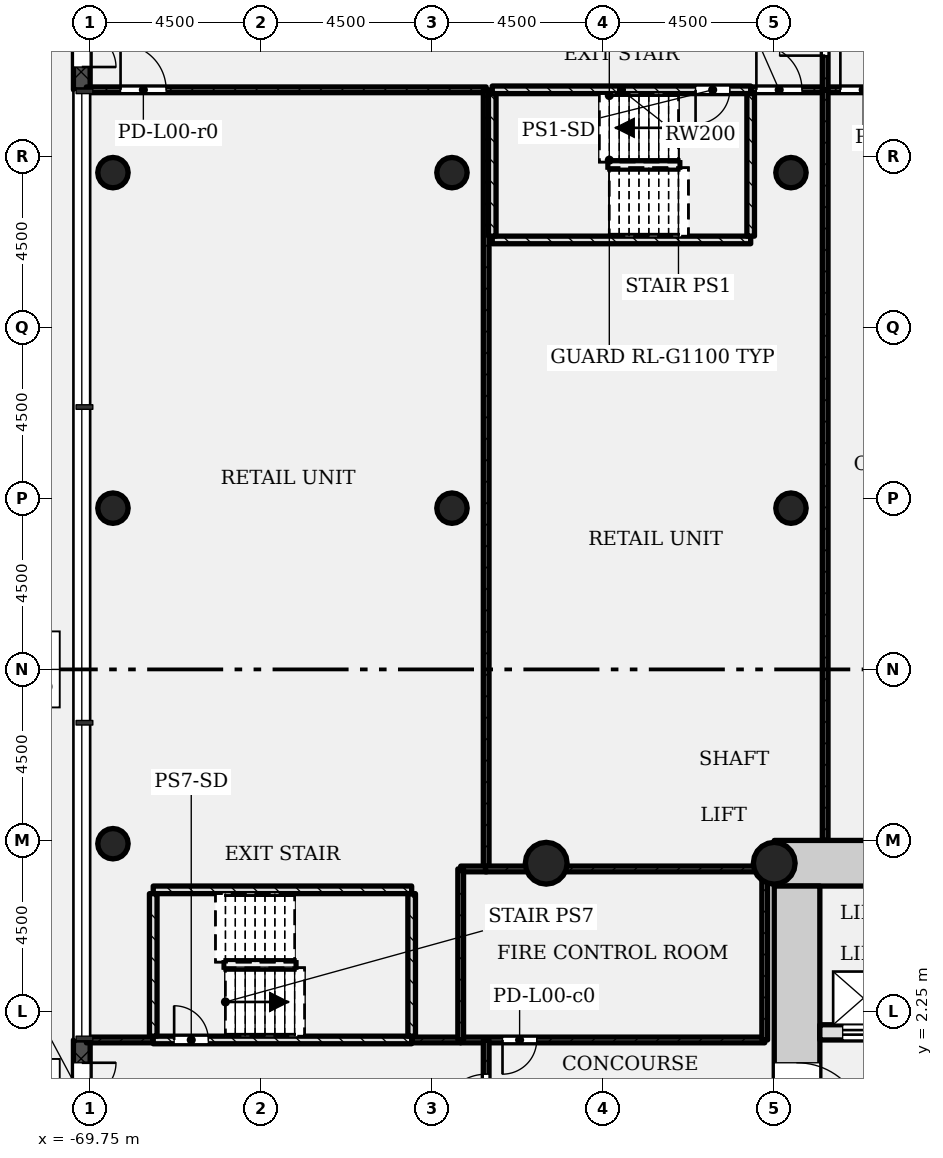
"""IFC4 building model, lengths in metres.
Left out: names, types, materials, properties, quantities, classifications, styles, units other than length and angle.
Written with IfcOpenShell. Run it as: python <this file> out.ifc"""

import sys

from ifc_helpers import new_model, si_unit, direction, frame, frame_2d, origin, origin_2d, place, context, subcontext, project, spatial, rectangle, hollow_circle, extrude, element, fill, save


model = new_model("IFC4")
c1 = context("Model", 3, precision=1e-05, world=origin(), true_north=direction((0.0, 1.0)))
c2 = subcontext(c1, "Body", "Model", "MODEL_VIEW")
j1 = project(units=[si_unit("LENGTHUNIT", "METRE"), si_unit("PLANEANGLEUNIT", "RADIAN")], contexts=[c1])
p1 = place(None, origin())
s1 = spatial("IfcSite", under=j1, at=p1, CompositionType="ELEMENT")
p2 = place(p1, origin())
s2 = spatial("IfcBuilding", under=s1, at=p2, CompositionType="ELEMENT")
p3 = place(p2, origin())
s3 = spatial("IfcBuildingStorey", under=s2, at=p3, CompositionType="ELEMENT", Elevation=0.0)
p4 = place(p3, frame((-43.95, 6.15, -0.4), z_axis=(0.0, 0.0, 1.0), x_axis=(-1.0, 0.0, 0.0)))
e1 = element("IfcWall", 1, at=p4, inside=s3, PredefinedType="SHEAR", context=c2, shape_type="SweptSolid", body=[
    extrude(rectangle(XDim=7.8, YDim=1.2, at=frame_2d((3.9, 0.0))), origin(), (0.0, 0.0, 1.0), 6.4),
])
p5 = place(p3, frame((-51.15, 5.55, -0.4), z_axis=(0.0, 0.0, 1.0), x_axis=(0.0, -1.0, 0.0)))
e2 = element("IfcWall", 2, at=p5, inside=s3, PredefinedType="SHEAR", context=c2, shape_type="SweptSolid", body=[
    extrude(rectangle(XDim=12.3, YDim=1.2, at=frame_2d((6.15, 0.0))), origin(), (0.0, 0.0, 1.0), 6.4),
])
p6 = place(p5, frame((4.65, 0.0, 0.4)))
e3 = element("IfcOpeningElement", 3, at=p6, cuts=e2, PredefinedType="OPENING", context=c2, shape_type="SweptSolid", body=[
    extrude(rectangle(XDim=1.8, YDim=2.1, at=frame_2d((0.9, 1.05))), frame((0.0, 0.61, 0.0), z_axis=(0.0, -1.0, 0.0), x_axis=(1.0, 0.0, 0.0)), (0.0, 0.0, 1.0), 1.22),
])
p7 = place(p3, frame((-50.55, 1.7, -0.4), z_axis=(0.0, 0.0, 1.0), x_axis=(1.0, 0.0, 0.0)))
e4 = element("IfcWall", 4, at=p7, inside=s3, PredefinedType="SHEAR", context=c2, shape_type="SweptSolid", body=[
    extrude(rectangle(XDim=6.6, YDim=0.4, at=frame_2d((3.3, 0.0))), origin(), (0.0, 0.0, 1.0), 6.4),
])
p8 = place(p7, frame((4.95, 0.0, 0.4)))
e5 = element("IfcOpeningElement", 5, at=p8, cuts=e4, PredefinedType="OPENING", context=c2, shape_type="SweptSolid", body=[
    extrude(rectangle(XDim=1.1, YDim=2.1, at=frame_2d((0.55, 1.05))), frame((0.0, 0.21, 0.0), z_axis=(0.0, -1.0, 0.0), x_axis=(1.0, 0.0, 0.0)), (0.0, 0.0, 1.0), 0.42),
])
p9 = place(p7, frame((2.8, 0.0, 0.4)))
e6 = element("IfcOpeningElement", 6, at=p9, cuts=e4, PredefinedType="OPENING", context=c2, shape_type="SweptSolid", body=[
    extrude(rectangle(XDim=1.1, YDim=2.1, at=frame_2d((0.55, 1.05))), frame((0.0, 0.21, 0.0), z_axis=(0.0, -1.0, 0.0), x_axis=(1.0, 0.0, 0.0)), (0.0, 0.0, 1.0), 0.42),
])
p10 = place(p7, frame((0.6, 0.0, 0.4)))
e7 = element("IfcOpeningElement", 7, at=p10, cuts=e4, PredefinedType="OPENING", context=c2, shape_type="SweptSolid", body=[
    extrude(rectangle(XDim=1.1, YDim=2.1, at=frame_2d((0.55, 1.05))), frame((0.0, 0.21, 0.0), z_axis=(0.0, -1.0, 0.0), x_axis=(1.0, 0.0, 0.0)), (0.0, 0.0, 1.0), 0.42),
])
for number, where, z_axis, x_axis in (
    (8, (-51.75, 6.15, -0.4), (0.0, 0.0, 1.0), (1.0, 0.0, 0.0)),
    (9, (-57.75, 6.15, -0.4), (0.0, 0.0, 1.0), (1.0, 0.0, 0.0)),
):
    element("IfcColumn", number, at=place(p3, frame(where, z_axis=z_axis, x_axis=x_axis)), inside=s3, PredefinedType="COLUMN", context=c2, shape_type="SweptSolid", body=[
        extrude(hollow_circle(Radius=0.55, WallThickness=0.04, at=origin_2d()), origin(), (0.0, 0.0, 1.0), 6.4),
    ])
for number, where, z_axis, x_axis in (
    (10, (-69.15, 6.664, -0.4), (0.0, 0.0, 1.0), (1.0, 0.0, 0.0)),
    (11, (-69.15, 15.493, -0.4), (0.0, 0.0, 1.0), (1.0, 0.0, 0.0)),
    (12, (-60.23, 15.493, -0.4), (0.0, 0.0, 1.0), (1.0, 0.0, 0.0)),
    (13, (-51.31, 15.493, -0.4), (0.0, 0.0, 1.0), (1.0, 0.0, 0.0)),
    (14, (-69.15, 24.321, -0.4), (0.0, 0.0, 1.0), (1.0, 0.0, 0.0)),
    (15, (-60.23, 24.321, -0.4), (0.0, 0.0, 1.0), (1.0, 0.0, 0.0)),
    (16, (-51.31, 24.321, -0.4), (0.0, 0.0, 1.0), (1.0, 0.0, 0.0)),
):
    element("IfcColumn", number, at=place(p3, frame(where, z_axis=z_axis, x_axis=x_axis)), inside=s3, PredefinedType="COLUMN", context=c2, shape_type="SweptSolid", body=[
        extrude(hollow_circle(Radius=0.4, WallThickness=0.028, at=origin_2d()), origin(), (0.0, 0.0, 1.0), 6.4),
    ])
p11 = place(p3, frame((-69.97, 29.5, 0.0), z_axis=(0.0, 0.0, 1.0), x_axis=(0.0, -1.0, 0.0)))
e17 = element("IfcWall", 17, at=p11, inside=s3, PredefinedType="STANDARD", context=c2, shape_type="SweptSolid", body=[
    extrude(rectangle(XDim=3.0, YDim=0.44, at=frame_2d((1.5, 0.0))), origin(), (0.0, 0.0, 1.0), 5.7),
])
p12 = place(p11, frame((0.6, 0.0, 0.0)))
e18 = element("IfcOpeningElement", 18, at=p12, cuts=e17, PredefinedType="OPENING", context=c2, shape_type="SweptSolid", body=[
    extrude(rectangle(XDim=1.8, YDim=2.1, at=frame_2d((0.9, 1.05))), frame((0.0, 0.23, 0.0), z_axis=(0.0, -1.0, 0.0), x_axis=(1.0, 0.0, 0.0)), (0.0, 0.0, 1.0), 0.46),
])
p13 = place(p3, frame((-69.97, 1.5, 0.0), z_axis=(0.0, 0.0, 1.0), x_axis=(0.0, -1.0, 0.0)))
e19 = element("IfcWall", 19, at=p13, inside=s3, PredefinedType="STANDARD", context=c2, shape_type="SweptSolid", body=[
    extrude(rectangle(XDim=3.0, YDim=0.44, at=frame_2d((1.5, 0.0))), origin(), (0.0, 0.0, 1.0), 5.7),
])
p14 = place(p13, frame((0.6, 0.0, 0.0)))
e20 = element("IfcOpeningElement", 20, at=p14, cuts=e19, PredefinedType="OPENING", context=c2, shape_type="SweptSolid", body=[
    extrude(rectangle(XDim=1.8, YDim=2.1, at=frame_2d((0.9, 1.05))), frame((0.0, 0.23, 0.0), z_axis=(0.0, -1.0, 0.0), x_axis=(1.0, 0.0, 0.0)), (0.0, 0.0, 1.0), 0.46),
])
p15 = place(p3, frame((-60.0, 1.5, 0.0), z_axis=(0.0, 0.0, 1.0), x_axis=(-1.0, 0.0, 0.0)))
e21 = element("IfcWall", 21, at=p15, inside=s3, PredefinedType="PARTITIONING", context=c2, shape_type="SweptSolid", body=[
    extrude(rectangle(XDim=1.29, YDim=0.15, at=frame_2d((0.645, 0.0))), origin(), (0.0, 0.0, 1.0), 5.58),
])
p16 = place(p3, frame((-68.09, 1.5, 0.0), z_axis=(0.0, 0.0, 1.0), x_axis=(-1.0, 0.0, 0.0)))
e22 = element("IfcWall", 22, at=p16, inside=s3, PredefinedType="PARTITIONING", context=c2, shape_type="SweptSolid", body=[
    extrude(rectangle(XDim=1.76, YDim=0.15, at=frame_2d((0.88, 0.0))), origin(), (0.0, 0.0, 1.0), 5.58),
])
p17 = place(p3, frame((-69.85, 26.5, 0.0), z_axis=(0.0, 0.0, 1.0), x_axis=(1.0, 0.0, 0.0)))
e23 = element("IfcWall", 23, at=p17, inside=s3, PredefinedType="PARTITIONING", context=c2, shape_type="SweptSolid", body=[
    extrude(rectangle(XDim=10.52, YDim=0.15, at=frame_2d((5.26, 0.0))), origin(), (0.0, 0.0, 1.0), 5.58),
])
p18 = place(p17, frame((0.9, 0.0, 0.0)))
e24 = element("IfcOpeningElement", 24, at=p18, cuts=e23, PredefinedType="OPENING", context=c2, shape_type="SweptSolid", body=[
    extrude(rectangle(XDim=1.2, YDim=2.1, at=frame_2d((0.6, 1.05))), frame((0.0, 0.085, 0.0), z_axis=(0.0, -1.0, 0.0), x_axis=(1.0, 0.0, 0.0)), (0.0, 0.0, 1.0), 0.17),
])
p19 = place(p3, frame((-59.33, 26.5, 0.0), z_axis=(0.0, 0.0, 1.0), x_axis=(0.0, -1.0, 0.0)))
e25 = element("IfcWall", 25, at=p19, inside=s3, PredefinedType="PARTITIONING", context=c2, shape_type="SweptSolid", body=[
    extrude(rectangle(XDim=20.5, YDim=0.15, at=frame_2d((10.25, 0.0))), origin(), (0.0, 0.0, 1.0), 5.58),
])
p20 = place(p3, frame((-52.37, 26.5, 0.0), z_axis=(0.0, 0.0, 1.0), x_axis=(1.0, 0.0, 0.0)))
e26 = element("IfcWall", 26, at=p20, inside=s3, PredefinedType="PARTITIONING", context=c2, shape_type="SweptSolid", body=[
    extrude(rectangle(XDim=1.96, YDim=0.15, at=frame_2d((0.98, 0.0))), origin(), (0.0, 0.0, 1.0), 5.58),
])
p21 = place(p20, frame((0.15, 0.0, 0.0)))
e27 = element("IfcOpeningElement", 27, at=p21, cuts=e26, PredefinedType="OPENING", context=c2, shape_type="SweptSolid", body=[
    extrude(rectangle(XDim=1.2, YDim=2.1, at=frame_2d((0.6, 1.05))), frame((0.0, 0.085, 0.0), z_axis=(0.0, -1.0, 0.0), x_axis=(1.0, 0.0, 0.0)), (0.0, 0.0, 1.0), 0.17),
])
p22 = place(p3, frame((-50.41, 26.5, 0.0), z_axis=(0.0, 0.0, 1.0), x_axis=(1.0, 0.0, 0.0)))
e28 = element("IfcWall", 28, at=p22, inside=s3, PredefinedType="PARTITIONING", context=c2, shape_type="SweptSolid", body=[
    extrude(rectangle(XDim=8.92, YDim=0.15, at=frame_2d((4.46, 0.0))), origin(), (0.0, 0.0, 1.0), 5.58),
])
p23 = place(p22, frame((0.4, 0.0, 0.0)))
e29 = element("IfcOpeningElement", 29, at=p23, cuts=e28, PredefinedType="OPENING", context=c2, shape_type="SweptSolid", body=[
    extrude(rectangle(XDim=1.2, YDim=2.1, at=frame_2d((0.6, 1.05))), frame((0.0, 0.085, 0.0), z_axis=(0.0, -1.0, 0.0), x_axis=(1.0, 0.0, 0.0)), (0.0, 0.0, 1.0), 0.17),
])
p24 = place(p3, frame((-50.41, 6.75, 0.0), z_axis=(0.0, 0.0, 1.0), x_axis=(0.0, 1.0, 0.0)))
e30 = element("IfcWall", 30, at=p24, inside=s3, PredefinedType="PARTITIONING", context=c2, shape_type="SweptSolid", body=[
    extrude(rectangle(XDim=19.75, YDim=0.15, at=frame_2d((9.875, 0.0))), origin(), (0.0, 0.0, 1.0), 5.58),
])
p25 = place(p3, frame((-60.0, 1.5, 0.0), z_axis=(0.0, 0.0, 1.0), x_axis=(1.0, 0.0, 0.0)))
e31 = element("IfcWall", 31, at=p25, inside=s3, PredefinedType="PARTITIONING", context=c2, shape_type="SweptSolid", body=[
    extrude(rectangle(XDim=8.0, YDim=0.15, at=frame_2d((4.0, 0.0))), origin(), (0.0, 0.0, 1.0), 5.58),
])
p26 = place(p25, frame((1.1, 0.0, 0.0)))
e32 = element("IfcOpeningElement", 32, at=p26, cuts=e31, PredefinedType="OPENING", context=c2, shape_type="SweptSolid", body=[
    extrude(rectangle(XDim=0.9, YDim=2.1, at=frame_2d((0.45, 1.05))), frame((0.0, 0.085, 0.0), z_axis=(0.0, -1.0, 0.0), x_axis=(1.0, 0.0, 0.0)), (0.0, 0.0, 1.0), 0.17),
])
p27 = place(p3, frame((-59.31, 6.0, 0.0), z_axis=(0.0, 0.0, 1.0), x_axis=(-1.0, 0.0, 0.0)))
e33 = element("IfcWall", 33, at=p27, inside=s3, PredefinedType="PARTITIONING", context=c2, shape_type="SweptSolid", body=[
    extrude(rectangle(XDim=0.69, YDim=0.15, at=frame_2d((0.345, 0.0))), origin(), (0.0, 0.0, 1.0), 5.58),
])
for number, where, z_axis, x_axis in (
    (34, (-60.0, 6.0, 0.0), (0.0, 0.0, 1.0), (0.0, -1.0, 0.0)),
    (35, (-52.0, 1.5, 0.0), (0.0, 0.0, 1.0), (0.0, 1.0, 0.0)),
):
    element("IfcWall", number, at=place(p3, frame(where, z_axis=z_axis, x_axis=x_axis)), inside=s3, PredefinedType="PARTITIONING", context=c2, shape_type="SweptSolid", body=[
        extrude(rectangle(XDim=4.5, YDim=0.15, at=frame_2d((2.25, 0.0))), origin(), (0.0, 0.0, 1.0), 5.58),
    ])
p28 = place(p3, frame((-52.0, 6.0, 0.0), z_axis=(0.0, 0.0, 1.0), x_axis=(-1.0, 0.0, 0.0)))
e36 = element("IfcWall", 36, at=p28, inside=s3, PredefinedType="PARTITIONING", context=c2, shape_type="SweptSolid", body=[
    extrude(rectangle(XDim=7.35, YDim=0.15, at=frame_2d((3.675, 0.0))), origin(), (0.0, 0.0, 1.0), 5.58),
])
p29 = place(p3, frame((-50.41, 26.5, 0.0), z_axis=(0.0, 0.0, 1.0), x_axis=(0.0, 1.0, 0.0)))
e37 = element("IfcWall", 37, at=p29, inside=s3, PredefinedType="PARTITIONING", context=c2, shape_type="SweptSolid", body=[
    extrude(rectangle(XDim=3.0, YDim=0.15, at=frame_2d((1.5, 0.0))), origin(), (0.0, 0.0, 1.0), 5.58),
])
p30 = place(p29, frame((0.9, 0.0, 0.0)))
e38 = element("IfcOpeningElement", 38, at=p30, cuts=e37, PredefinedType="OPENING", context=c2, shape_type="SweptSolid", body=[
    extrude(rectangle(XDim=1.2, YDim=2.1, at=frame_2d((0.6, 1.05))), frame((0.0, 0.085, 0.0), z_axis=(0.0, -1.0, 0.0), x_axis=(1.0, 0.0, 0.0)), (0.0, 0.0, 1.0), 0.17),
])
p31 = place(p3, frame((-59.33, -1.5, 0.0), z_axis=(0.0, 0.0, 1.0), x_axis=(0.0, 1.0, 0.0)))
e39 = element("IfcWall", 39, at=p31, inside=s3, PredefinedType="PARTITIONING", context=c2, shape_type="SweptSolid", body=[
    extrude(rectangle(XDim=3.0, YDim=0.15, at=frame_2d((1.5, 0.0))), origin(), (0.0, 0.0, 1.0), 5.58),
])
p32 = place(p31, frame((0.9, 0.0, 0.0)))
e40 = element("IfcOpeningElement", 40, at=p32, cuts=e39, PredefinedType="OPENING", context=c2, shape_type="SweptSolid", body=[
    extrude(rectangle(XDim=1.2, YDim=2.1, at=frame_2d((0.6, 1.05))), frame((0.0, 0.085, 0.0), z_axis=(0.0, -1.0, 0.0), x_axis=(1.0, 0.0, 0.0)), (0.0, 0.0, 1.0), 0.17),
])
p33 = place(p3, frame((-59.17, 26.5, 0.0), z_axis=(0.0, 0.0, 1.0), x_axis=(1.0, 0.0, 0.0)))
e41 = element("IfcWall", 41, at=p33, inside=s3, PredefinedType="SHEAR", context=c2, shape_type="SweptSolid", body=[
    extrude(rectangle(XDim=6.8, YDim=0.2, at=frame_2d((3.4, 0.0))), origin(), (0.0, 0.0, 1.0), 5.58),
])
p34 = place(p33, frame((5.35, 0.0, 0.0)))
e42 = element("IfcOpeningElement", 42, at=p34, cuts=e41, PredefinedType="OPENING", context=c2, shape_type="SweptSolid", body=[
    extrude(rectangle(XDim=0.9, YDim=2.1, at=frame_2d((0.45, 1.05))), frame((0.0, 0.11, 0.0), z_axis=(0.0, -1.0, 0.0), x_axis=(1.0, 0.0, 0.0)), (0.0, 0.0, 1.0), 0.22),
])
p35 = place(p3, frame((-59.17, 22.55, 0.0), z_axis=(0.0, 0.0, 1.0), x_axis=(1.0, 0.0, 0.0)))
e43 = element("IfcWall", 43, at=p35, inside=s3, PredefinedType="SHEAR", context=c2, shape_type="SweptSolid", body=[
    extrude(rectangle(XDim=6.8, YDim=0.2, at=frame_2d((3.4, 0.0))), origin(), (0.0, 0.0, 1.0), 5.58),
])
for number, where, z_axis, x_axis in (
    (44, (-59.17, 22.65, 0.0), (0.0, 0.0, 1.0), (0.0, 1.0, 0.0)),
    (45, (-52.37, 22.65, 0.0), (0.0, 0.0, 1.0), (0.0, 1.0, 0.0)),
):
    element("IfcWall", number, at=place(p3, frame(where, z_axis=z_axis, x_axis=x_axis)), inside=s3, PredefinedType="SHEAR", context=c2, shape_type="SweptSolid", body=[
        extrude(rectangle(XDim=3.75, YDim=0.2, at=frame_2d((1.875, 0.0))), origin(), (0.0, 0.0, 1.0), 5.58),
    ])
p36 = place(p3, frame((-68.09, 1.5, 0.0), z_axis=(0.0, 0.0, 1.0), x_axis=(1.0, 0.0, 0.0)))
e46 = element("IfcWall", 46, at=p36, inside=s3, PredefinedType="SHEAR", context=c2, shape_type="SweptSolid", body=[
    extrude(rectangle(XDim=6.8, YDim=0.2, at=frame_2d((3.4, 0.0))), origin(), (0.0, 0.0, 1.0), 5.58),
])
p37 = place(p36, frame((0.55, 0.0, 0.0)))
e47 = element("IfcOpeningElement", 47, at=p37, cuts=e46, PredefinedType="OPENING", context=c2, shape_type="SweptSolid", body=[
    extrude(rectangle(XDim=0.9, YDim=2.1, at=frame_2d((0.45, 1.05))), frame((0.0, 0.11, 0.0), z_axis=(0.0, -1.0, 0.0), x_axis=(1.0, 0.0, 0.0)), (0.0, 0.0, 1.0), 0.22),
])
p38 = place(p3, frame((-68.09, 5.45, 0.0), z_axis=(0.0, 0.0, 1.0), x_axis=(1.0, 0.0, 0.0)))
e48 = element("IfcWall", 48, at=p38, inside=s3, PredefinedType="SHEAR", context=c2, shape_type="SweptSolid", body=[
    extrude(rectangle(XDim=6.8, YDim=0.2, at=frame_2d((3.4, 0.0))), origin(), (0.0, 0.0, 1.0), 5.58),
])
for number, where, z_axis, x_axis in (
    (49, (-68.09, 1.6, 0.0), (0.0, 0.0, 1.0), (0.0, 1.0, 0.0)),
    (50, (-61.29, 1.6, 0.0), (0.0, 0.0, 1.0), (0.0, 1.0, 0.0)),
):
    element("IfcWall", number, at=place(p3, frame(where, z_axis=z_axis, x_axis=x_axis)), inside=s3, PredefinedType="SHEAR", context=c2, shape_type="SweptSolid", body=[
        extrude(rectangle(XDim=3.75, YDim=0.2, at=frame_2d((1.875, 0.0))), origin(), (0.0, 0.0, 1.0), 5.58),
    ])
p39 = place(p12, origin())
e51 = element("IfcDoor", 51, at=p39, inside=s3, OperationType="DOUBLE_DOOR_DOUBLE_SWING", PredefinedType="DOOR", context=c2, shape_type="SweptSolid", body=[
    extrude(rectangle(XDim=1.8, YDim=2.1, at=frame_2d((0.9, 1.05))), frame((0.0, 0.025, 0.0), z_axis=(0.0, -1.0, 0.0), x_axis=(1.0, 0.0, 0.0)), (0.0, 0.0, 1.0), 0.05),
])
fill(e18, e51)
p40 = place(p14, origin())
e52 = element("IfcDoor", 52, at=p40, inside=s3, OperationType="DOUBLE_DOOR_DOUBLE_SWING", PredefinedType="DOOR", context=c2, shape_type="SweptSolid", body=[
    extrude(rectangle(XDim=1.8, YDim=2.1, at=frame_2d((0.9, 1.05))), frame((0.0, 0.025, 0.0), z_axis=(0.0, -1.0, 0.0), x_axis=(1.0, 0.0, 0.0)), (0.0, 0.0, 1.0), 0.05),
])
fill(e20, e52)
p41 = place(p18, origin())
e53 = element("IfcDoor", 53, at=p41, inside=s3, OperationType="SINGLE_SWING_RIGHT", PredefinedType="DOOR", context=c2, shape_type="SweptSolid", body=[
    extrude(rectangle(XDim=1.2, YDim=2.1, at=frame_2d((0.6, 1.05))), frame((0.0, 0.025, 0.0), z_axis=(0.0, -1.0, 0.0), x_axis=(1.0, 0.0, 0.0)), (0.0, 0.0, 1.0), 0.05),
])
fill(e24, e53)
p42 = place(p21, origin())
e54 = element("IfcDoor", 54, at=p42, inside=s3, OperationType="SINGLE_SWING_RIGHT", PredefinedType="DOOR", context=c2, shape_type="SweptSolid", body=[
    extrude(rectangle(XDim=1.2, YDim=2.1, at=frame_2d((0.6, 1.05))), frame((0.0, 0.025, 0.0), z_axis=(0.0, -1.0, 0.0), x_axis=(1.0, 0.0, 0.0)), (0.0, 0.0, 1.0), 0.05),
])
fill(e27, e54)
p43 = place(p23, origin())
e55 = element("IfcDoor", 55, at=p43, inside=s3, OperationType="SINGLE_SWING_RIGHT", PredefinedType="DOOR", context=c2, shape_type="SweptSolid", body=[
    extrude(rectangle(XDim=1.2, YDim=2.1, at=frame_2d((0.6, 1.05))), frame((0.0, 0.025, 0.0), z_axis=(0.0, -1.0, 0.0), x_axis=(1.0, 0.0, 0.0)), (0.0, 0.0, 1.0), 0.05),
])
fill(e29, e55)
p44 = place(p26, origin())
e56 = element("IfcDoor", 56, at=p44, inside=s3, OperationType="SINGLE_SWING_LEFT", PredefinedType="DOOR", context=c2, shape_type="SweptSolid", body=[
    extrude(rectangle(XDim=0.9, YDim=2.1, at=frame_2d((0.45, 1.05))), frame((0.0, 0.025, 0.0), z_axis=(0.0, -1.0, 0.0), x_axis=(1.0, 0.0, 0.0)), (0.0, 0.0, 1.0), 0.05),
])
fill(e32, e56)
p45 = place(p30, origin())
e57 = element("IfcDoor", 57, at=p45, inside=s3, OperationType="SINGLE_SWING_RIGHT", PredefinedType="DOOR", context=c2, shape_type="SweptSolid", body=[
    extrude(rectangle(XDim=1.2, YDim=2.1, at=frame_2d((0.6, 1.05))), frame((0.0, 0.025, 0.0), z_axis=(0.0, -1.0, 0.0), x_axis=(1.0, 0.0, 0.0)), (0.0, 0.0, 1.0), 0.05),
])
fill(e38, e57)
p46 = place(p32, origin())
e58 = element("IfcDoor", 58, at=p46, inside=s3, OperationType="SINGLE_SWING_RIGHT", PredefinedType="DOOR", context=c2, shape_type="SweptSolid", body=[
    extrude(rectangle(XDim=1.2, YDim=2.1, at=frame_2d((0.6, 1.05))), frame((0.0, 0.025, 0.0), z_axis=(0.0, -1.0, 0.0), x_axis=(1.0, 0.0, 0.0)), (0.0, 0.0, 1.0), 0.05),
])
fill(e40, e58)
p47 = place(p34, origin())
e59 = element("IfcDoor", 59, at=p47, inside=s3, OperationType="SINGLE_SWING_LEFT", PredefinedType="DOOR", context=c2, shape_type="SweptSolid", body=[
    extrude(rectangle(XDim=0.9, YDim=2.1, at=frame_2d((0.45, 1.05))), frame((0.0, 0.025, 0.0), z_axis=(0.0, -1.0, 0.0), x_axis=(1.0, 0.0, 0.0)), (0.0, 0.0, 1.0), 0.05),
])
fill(e42, e59)
p48 = place(p37, origin())
e60 = element("IfcDoor", 60, at=p48, inside=s3, OperationType="SINGLE_SWING_RIGHT", PredefinedType="DOOR", context=c2, shape_type="SweptSolid", body=[
    extrude(rectangle(XDim=0.9, YDim=2.1, at=frame_2d((0.45, 1.05))), frame((0.0, 0.025, 0.0), z_axis=(0.0, -1.0, 0.0), x_axis=(1.0, 0.0, 0.0)), (0.0, 0.0, 1.0), 0.05),
])
fill(e47, e60)
p49 = place(p10, origin())
e61 = element("IfcDoor", 61, at=p49, inside=s3, OperationType="SLIDING_TO_LEFT", PredefinedType="DOOR", context=c2, shape_type="SweptSolid", body=[
    extrude(rectangle(XDim=1.1, YDim=2.1, at=frame_2d((0.55, 1.05))), frame((0.0, 0.025, 0.0), z_axis=(0.0, -1.0, 0.0), x_axis=(1.0, 0.0, 0.0)), (0.0, 0.0, 1.0), 0.05),
])
fill(e7, e61)
p50 = place(p6, origin())
e62 = element("IfcDoor", 62, at=p50, inside=s3, OperationType="SINGLE_SWING_LEFT", PredefinedType="DOOR", context=c2, shape_type="SweptSolid", body=[
    extrude(rectangle(XDim=1.8, YDim=2.1, at=frame_2d((0.9, 1.05))), frame((0.0, 0.025, 0.0), z_axis=(0.0, -1.0, 0.0), x_axis=(1.0, 0.0, 0.0)), (0.0, 0.0, 1.0), 0.05),
])
fill(e3, e62)
save(model, sys.argv[1])
